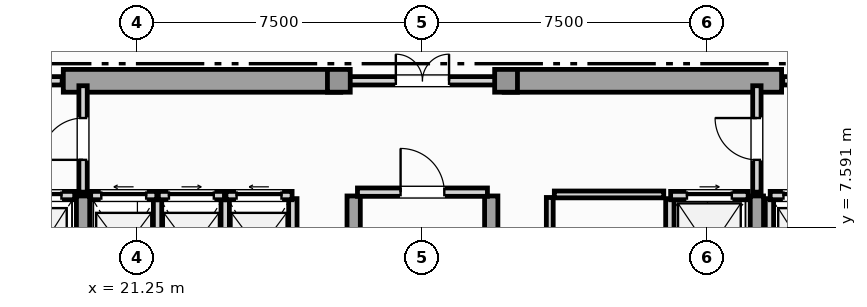
"""IFC4 building model, lengths in metres.
Left out: names, types, materials, properties, quantities, classifications, styles, units other than length and angle.
Written with IfcOpenShell. Run it as: python <this file> out.ifc"""

import sys

from ifc_helpers import new_model, si_unit, direction, frame, frame_2d, origin, origin_2d, place, context, subcontext, project, spatial, rectangle, extrude, element, fill, save


model = new_model("IFC4")
c1 = context("Model", 3, precision=1e-05, world=origin(), true_north=direction((0.0, 1.0)))
c2 = subcontext(c1, "Body", "Model", "MODEL_VIEW")
j1 = project(units=[si_unit("LENGTHUNIT", "METRE"), si_unit("PLANEANGLEUNIT", "RADIAN")], contexts=[c1])
p1 = place(None, origin())
s1 = spatial("IfcSite", under=j1, at=p1, CompositionType="ELEMENT")
p2 = place(p1, origin())
s2 = spatial("IfcBuilding", under=s1, at=p2, CompositionType="ELEMENT")
p3 = place(p2, frame((0.0, 0.0, 281.05)))
s3 = spatial("IfcBuildingStorey", under=s2, at=p3, CompositionType="ELEMENT", Elevation=281.05)
for number, where, z_axis, x_axis in (
    (1, (19.3, 11.45, 0.0), (0.0, 0.0, 1.0), (1.0, 0.0, 0.0)),
    (2, (30.9, 11.45, 0.0), (0.0, 0.0, 1.0), (1.0, 0.0, 0.0)),
):
    element("IfcWall", number, at=place(p3, frame(where, z_axis=z_axis, x_axis=x_axis)), inside=s3, PredefinedType="SHEAR", context=c2, shape_type="SweptSolid", body=[
        extrude(rectangle(XDim=7.3, YDim=0.6, at=frame_2d((3.65, 0.0))), origin(), (0.0, 0.0, 1.0), 3.65),
    ])
for number, where, z_axis, x_axis in (
    (3, (19.82, 0.92, 0.0), (0.0, 0.0, 1.0), (0.0, 1.0, 0.0)),
    (4, (26.94, 0.92, 0.0), (0.0, 0.0, 1.0), (0.0, 1.0, 0.0)),
    (5, (30.56, 0.92, 0.0), (0.0, 0.0, 1.0), (0.0, 1.0, 0.0)),
    (6, (37.55, 0.92, 0.0), (0.0, 0.0, 1.0), (0.0, 1.0, 0.0)),
):
    element("IfcWall", number, at=place(p3, frame(where, z_axis=z_axis, x_axis=x_axis)), inside=s3, PredefinedType="SHEAR", context=c2, shape_type="SweptSolid", body=[
        extrude(rectangle(XDim=7.5, YDim=0.35, at=frame_2d((3.75, 0.0))), origin(), (0.0, 0.0, 1.0), 3.65),
    ])
for number, where, z_axis, x_axis in (
    (7, (26.55, 11.45, 0.0), (0.0, 0.0, 1.0), (1.0, 0.0, 0.0)),
    (8, (30.95, 11.45, 0.0), (0.0, 0.0, 1.0), (1.0, 0.0, 0.0)),
):
    element("IfcColumn", number, at=place(p3, frame(where, z_axis=z_axis, x_axis=x_axis)), inside=s3, PredefinedType="COLUMN", context=c2, shape_type="SweptSolid", body=[
        extrude(rectangle(XDim=0.6, YDim=0.6, at=origin_2d()), origin(), (0.0, 0.0, 1.0), 3.85),
    ])
p4 = place(p3, frame((17.78, 8.43, 0.0), z_axis=(0.0, 0.0, 1.0), x_axis=(1.0, 0.0, 0.0)))
e9 = element("IfcWall", 9, at=p4, inside=s3, PredefinedType="SOLIDWALL", context=c2, shape_type="SweptSolid", body=[
    extrude(rectangle(XDim=1.82, YDim=0.22, at=frame_2d((0.91, 0.0))), origin(), (0.0, 0.0, 1.0), 3.65),
])
p5 = place(p4, frame((0.35, 0.0, 0.0)))
e10 = element("IfcOpeningElement", 10, at=p5, cuts=e9, PredefinedType="OPENING", context=c2, shape_type="SweptSolid", body=[
    extrude(rectangle(XDim=1.12, YDim=2.25, at=frame_2d((0.56, 1.125))), frame((0.0, 0.12, 0.0), z_axis=(0.0, -1.0, 0.0), x_axis=(1.0, 0.0, 0.0)), (0.0, 0.0, 1.0), 0.24),
])
p6 = place(p3, frame((37.88, 5.65, 0.0), z_axis=(0.0, 0.0, 1.0), x_axis=(0.0, 1.0, 0.0)))
e11 = element("IfcWall", 11, at=p6, inside=s3, PredefinedType="SOLIDWALL", context=c2, shape_type="SweptSolid", body=[
    extrude(rectangle(XDim=2.7, YDim=0.22, at=frame_2d((1.35, 0.0))), origin(), (0.0, 0.0, 1.0), 3.65),
])
p7 = place(p3, frame((37.9, 8.43, 0.0), z_axis=(0.0, 0.0, 1.0), x_axis=(1.0, 0.0, 0.0)))
e12 = element("IfcWall", 12, at=p7, inside=s3, PredefinedType="SOLIDWALL", context=c2, shape_type="SweptSolid", body=[
    extrude(rectangle(XDim=1.82, YDim=0.22, at=frame_2d((0.91, 0.0))), origin(), (0.0, 0.0, 1.0), 3.65),
])
p8 = place(p7, frame((0.35, 0.0, 0.0)))
e13 = element("IfcOpeningElement", 13, at=p8, cuts=e12, PredefinedType="OPENING", context=c2, shape_type="SweptSolid", body=[
    extrude(rectangle(XDim=1.12, YDim=2.25, at=frame_2d((0.56, 1.125))), frame((0.0, 0.12, 0.0), z_axis=(0.0, -1.0, 0.0), x_axis=(1.0, 0.0, 0.0)), (0.0, 0.0, 1.0), 0.24),
])
p9 = place(p3, frame((35.26, 5.65, 0.0), z_axis=(0.0, 0.0, 1.0), x_axis=(0.0, 1.0, 0.0)))
e14 = element("IfcWall", 14, at=p9, inside=s3, PredefinedType="SOLIDWALL", context=c2, shape_type="SweptSolid", body=[
    extrude(rectangle(XDim=2.7, YDim=0.22, at=frame_2d((1.35, 0.0))), origin(), (0.0, 0.0, 1.0), 3.65),
])
p10 = place(p3, frame((35.28, 8.43, 0.0), z_axis=(0.0, 0.0, 1.0), x_axis=(1.0, 0.0, 0.0)))
e15 = element("IfcWall", 15, at=p10, inside=s3, PredefinedType="SOLIDWALL", context=c2, shape_type="SweptSolid", body=[
    extrude(rectangle(XDim=2.04, YDim=0.22, at=frame_2d((1.02, 0.0))), origin(), (0.0, 0.0, 1.0), 3.65),
])
p11 = place(p10, frame((0.43, 0.0, 0.0)))
e16 = element("IfcOpeningElement", 16, at=p11, cuts=e15, PredefinedType="OPENING", context=c2, shape_type="SweptSolid", body=[
    extrude(rectangle(XDim=1.18, YDim=2.2, at=frame_2d((0.59, 1.1))), frame((0.0, 0.12, 0.0), z_axis=(0.0, -1.0, 0.0), x_axis=(1.0, 0.0, 0.0)), (0.0, 0.0, 1.0), 0.24),
])
p12 = place(p3, frame((21.78, 5.65, 0.0), z_axis=(0.0, 0.0, 1.0), x_axis=(0.0, 1.0, 0.0)))
e17 = element("IfcWall", 17, at=p12, inside=s3, PredefinedType="SOLIDWALL", context=c2, shape_type="SweptSolid", body=[
    extrude(rectangle(XDim=2.7, YDim=0.22, at=frame_2d((1.35, 0.0))), origin(), (0.0, 0.0, 1.0), 3.65),
])
p13 = place(p3, frame((20.02, 8.43, 0.0), z_axis=(0.0, 0.0, 1.0), x_axis=(1.0, 0.0, 0.0)))
e18 = element("IfcWall", 18, at=p13, inside=s3, PredefinedType="SOLIDWALL", context=c2, shape_type="SweptSolid", body=[
    extrude(rectangle(XDim=1.74, YDim=0.22, at=frame_2d((0.87, 0.0))), origin(), (0.0, 0.0, 1.0), 3.65),
])
p14 = place(p13, frame((0.28, 0.0, 0.0)))
e19 = element("IfcOpeningElement", 19, at=p14, cuts=e18, PredefinedType="OPENING", context=c2, shape_type="SweptSolid", body=[
    extrude(rectangle(XDim=1.18, YDim=2.2, at=frame_2d((0.59, 1.1))), frame((0.0, 0.12, 0.0), z_axis=(0.0, -1.0, 0.0), x_axis=(1.0, 0.0, 0.0)), (0.0, 0.0, 1.0), 0.24),
])
p15 = place(p3, frame((23.56, 5.65, 0.0), z_axis=(0.0, 0.0, 1.0), x_axis=(0.0, 1.0, 0.0)))
e20 = element("IfcWall", 20, at=p15, inside=s3, PredefinedType="SOLIDWALL", context=c2, shape_type="SweptSolid", body=[
    extrude(rectangle(XDim=2.7, YDim=0.22, at=frame_2d((1.35, 0.0))), origin(), (0.0, 0.0, 1.0), 3.65),
])
p16 = place(p3, frame((21.8, 8.43, 0.0), z_axis=(0.0, 0.0, 1.0), x_axis=(1.0, 0.0, 0.0)))
e21 = element("IfcWall", 21, at=p16, inside=s3, PredefinedType="SOLIDWALL", context=c2, shape_type="SweptSolid", body=[
    extrude(rectangle(XDim=1.74, YDim=0.22, at=frame_2d((0.87, 0.0))), origin(), (0.0, 0.0, 1.0), 3.65),
])
p17 = place(p16, frame((0.28, 0.0, 0.0)))
e22 = element("IfcOpeningElement", 22, at=p17, cuts=e21, PredefinedType="OPENING", context=c2, shape_type="SweptSolid", body=[
    extrude(rectangle(XDim=1.18, YDim=2.2, at=frame_2d((0.59, 1.1))), frame((0.0, 0.12, 0.0), z_axis=(0.0, -1.0, 0.0), x_axis=(1.0, 0.0, 0.0)), (0.0, 0.0, 1.0), 0.24),
])
p18 = place(p3, frame((25.34, 5.65, 0.0), z_axis=(0.0, 0.0, 1.0), x_axis=(0.0, 1.0, 0.0)))
e23 = element("IfcWall", 23, at=p18, inside=s3, PredefinedType="SOLIDWALL", context=c2, shape_type="SweptSolid", body=[
    extrude(rectangle(XDim=2.7, YDim=0.22, at=frame_2d((1.35, 0.0))), origin(), (0.0, 0.0, 1.0), 3.65),
])
p19 = place(p3, frame((23.58, 8.43, 0.0), z_axis=(0.0, 0.0, 1.0), x_axis=(1.0, 0.0, 0.0)))
e24 = element("IfcWall", 24, at=p19, inside=s3, PredefinedType="SOLIDWALL", context=c2, shape_type="SweptSolid", body=[
    extrude(rectangle(XDim=1.74, YDim=0.22, at=frame_2d((0.87, 0.0))), origin(), (0.0, 0.0, 1.0), 3.65),
])
p20 = place(p19, frame((0.28, 0.0, 0.0)))
e25 = element("IfcOpeningElement", 25, at=p20, cuts=e24, PredefinedType="OPENING", context=c2, shape_type="SweptSolid", body=[
    extrude(rectangle(XDim=1.18, YDim=2.2, at=frame_2d((0.59, 1.1))), frame((0.0, 0.12, 0.0), z_axis=(0.0, -1.0, 0.0), x_axis=(1.0, 0.0, 0.0)), (0.0, 0.0, 1.0), 0.24),
])
p21 = place(p3, frame((27.04, 8.52, 0.0), z_axis=(0.0, 0.0, 1.0), x_axis=(1.0, 0.0, 0.0)))
e26 = element("IfcWall", 26, at=p21, inside=s3, PredefinedType="SOLIDWALL", context=c2, shape_type="SweptSolid", body=[
    extrude(rectangle(XDim=3.42, YDim=0.22, at=frame_2d((1.71, 0.0))), origin(), (0.0, 0.0, 1.0), 3.65),
])
p22 = place(p21, frame((1.135, 0.0, 0.0)))
e27 = element("IfcOpeningElement", 27, at=p22, cuts=e26, PredefinedType="OPENING", context=c2, shape_type="SweptSolid", body=[
    extrude(rectangle(XDim=1.15, YDim=2.2, at=frame_2d((0.575, 1.1))), frame((0.0, 0.12, 0.0), z_axis=(0.0, -1.0, 0.0), x_axis=(1.0, 0.0, 0.0)), (0.0, 0.0, 1.0), 0.24),
])
p23 = place(p3, frame((19.82, 8.52, 0.0), z_axis=(0.0, 0.0, 1.0), x_axis=(0.0, 1.0, 0.0)))
e28 = element("IfcWall", 28, at=p23, inside=s3, PredefinedType="SOLIDWALL", context=c2, shape_type="SweptSolid", body=[
    extrude(rectangle(XDim=2.8, YDim=0.22, at=frame_2d((1.4, 0.0))), origin(), (0.0, 0.0, 1.0), 3.105),
])
p24 = place(p23, frame((0.85, 0.0, 0.0)))
e29 = element("IfcOpeningElement", 29, at=p24, cuts=e28, PredefinedType="OPENING", context=c2, shape_type="SweptSolid", body=[
    extrude(rectangle(XDim=1.1, YDim=2.2, at=frame_2d((0.55, 1.1))), frame((0.0, 0.12, 0.0), z_axis=(0.0, -1.0, 0.0), x_axis=(1.0, 0.0, 0.0)), (0.0, 0.0, 1.0), 0.24),
])
p25 = place(p3, frame((37.55, 8.52, 0.0), z_axis=(0.0, 0.0, 1.0), x_axis=(0.0, 1.0, 0.0)))
e30 = element("IfcWall", 30, at=p25, inside=s3, PredefinedType="SOLIDWALL", context=c2, shape_type="SweptSolid", body=[
    extrude(rectangle(XDim=2.8, YDim=0.22, at=frame_2d((1.4, 0.0))), origin(), (0.0, 0.0, 1.0), 3.105),
])
p26 = place(p25, frame((0.85, 0.0, 0.0)))
e31 = element("IfcOpeningElement", 31, at=p26, cuts=e30, PredefinedType="OPENING", context=c2, shape_type="SweptSolid", body=[
    extrude(rectangle(XDim=1.1, YDim=2.2, at=frame_2d((0.55, 1.1))), frame((0.0, 0.12, 0.0), z_axis=(0.0, -1.0, 0.0), x_axis=(1.0, 0.0, 0.0)), (0.0, 0.0, 1.0), 0.24),
])
p27 = place(p3, frame((16.23, 11.45, 0.0), z_axis=(0.0, 0.0, 1.0), x_axis=(1.0, 0.0, 0.0)))
e32 = element("IfcWall", 32, at=p27, inside=s3, PredefinedType="SOLIDWALL", context=c2, shape_type="SweptSolid", body=[
    extrude(rectangle(XDim=3.04, YDim=0.22, at=frame_2d((1.52, 0.0))), origin(), (0.0, 0.0, 1.0), 3.65),
])
p28 = place(p27, frame((0.97, 0.0, 0.0)))
e33 = element("IfcOpeningElement", 33, at=p28, cuts=e32, PredefinedType="OPENING", context=c2, shape_type="SweptSolid", body=[
    extrude(rectangle(XDim=1.1, YDim=2.2, at=frame_2d((0.55, 1.1))), frame((0.0, 0.12, 0.0), z_axis=(0.0, -1.0, 0.0), x_axis=(1.0, 0.0, 0.0)), (0.0, 0.0, 1.0), 0.24),
])
p29 = place(p3, frame((26.63, 11.45, 0.0), z_axis=(0.0, 0.0, 1.0), x_axis=(1.0, 0.0, 0.0)))
e34 = element("IfcWall", 34, at=p29, inside=s3, PredefinedType="SOLIDWALL", context=c2, shape_type="SweptSolid", body=[
    extrude(rectangle(XDim=4.24, YDim=0.22, at=frame_2d((2.12, 0.0))), origin(), (0.0, 0.0, 1.0), 3.65),
])
p30 = place(p29, frame((1.42, 0.0, 0.0)))
e35 = element("IfcOpeningElement", 35, at=p30, cuts=e34, PredefinedType="OPENING", context=c2, shape_type="SweptSolid", body=[
    extrude(rectangle(XDim=1.4, YDim=2.2, at=frame_2d((0.7, 1.1))), frame((0.0, 0.12, 0.0), z_axis=(0.0, -1.0, 0.0), x_axis=(1.0, 0.0, 0.0)), (0.0, 0.0, 1.0), 0.24),
])
p31 = place(p3, frame((38.23, 11.45, 0.0), z_axis=(0.0, 0.0, 1.0), x_axis=(1.0, 0.0, 0.0)))
e36 = element("IfcWall", 36, at=p31, inside=s3, PredefinedType="SOLIDWALL", context=c2, shape_type="SweptSolid", body=[
    extrude(rectangle(XDim=3.04, YDim=0.22, at=frame_2d((1.52, 0.0))), origin(), (0.0, 0.0, 1.0), 3.65),
])
p32 = place(p31, frame((0.97, 0.0, 0.0)))
e37 = element("IfcOpeningElement", 37, at=p32, cuts=e36, PredefinedType="OPENING", context=c2, shape_type="SweptSolid", body=[
    extrude(rectangle(XDim=1.1, YDim=2.2, at=frame_2d((0.55, 1.1))), frame((0.0, 0.12, 0.0), z_axis=(0.0, -1.0, 0.0), x_axis=(1.0, 0.0, 0.0)), (0.0, 0.0, 1.0), 0.24),
])
p33 = place(p3, frame((32.1, 5.65, 0.0), z_axis=(0.0, 0.0, 1.0), x_axis=(0.0, 1.0, 0.0)))
e38 = element("IfcWall", 38, at=p33, inside=s3, PredefinedType="PARTITIONING", context=c2, shape_type="SweptSolid", body=[
    extrude(rectangle(XDim=2.73, YDim=0.18, at=frame_2d((1.365, 0.0))), origin(), (0.0, 0.0, 1.0), 3.65),
])
p34 = place(p33, frame((0.925, 0.0, 0.0)))
e39 = element("IfcOpeningElement", 39, at=p34, cuts=e38, PredefinedType="OPENING", context=c2, shape_type="SweptSolid", body=[
    extrude(rectangle(XDim=0.88, YDim=2.05, at=frame_2d((0.44, 1.025))), frame((0.0, 0.1, 0.0), z_axis=(0.0, -1.0, 0.0), x_axis=(1.0, 0.0, 0.0)), (0.0, 0.0, 1.0), 0.2),
])
p35 = place(p3, frame((32.22, 8.46, 0.0), z_axis=(0.0, 0.0, 1.0), x_axis=(1.0, 0.0, 0.0)))
e40 = element("IfcWall", 40, at=p35, inside=s3, PredefinedType="PARTITIONING", context=c2, shape_type="SweptSolid", body=[
    extrude(rectangle(XDim=2.88, YDim=0.18, at=frame_2d((1.44, 0.0))), origin(), (0.0, 0.0, 1.0), 3.65),
])
p36 = place(p5, origin())
e41 = element("IfcDoor", 41, at=p36, inside=s3, OperationType="SLIDING_TO_RIGHT", PredefinedType="DOOR", context=c2, shape_type="SweptSolid", body=[
    extrude(rectangle(XDim=1.12, YDim=2.25, at=frame_2d((0.56, 1.125))), frame((0.0, 0.025, 0.0), z_axis=(0.0, -1.0, 0.0), x_axis=(1.0, 0.0, 0.0)), (0.0, 0.0, 1.0), 0.05),
])
fill(e10, e41)
p37 = place(p8, origin())
e42 = element("IfcDoor", 42, at=p37, inside=s3, OperationType="SLIDING_TO_LEFT", PredefinedType="DOOR", context=c2, shape_type="SweptSolid", body=[
    extrude(rectangle(XDim=1.12, YDim=2.25, at=frame_2d((0.56, 1.125))), frame((0.0, 0.025, 0.0), z_axis=(0.0, -1.0, 0.0), x_axis=(1.0, 0.0, 0.0)), (0.0, 0.0, 1.0), 0.05),
])
fill(e13, e42)
p38 = place(p11, origin())
e43 = element("IfcDoor", 43, at=p38, inside=s3, OperationType="SLIDING_TO_RIGHT", PredefinedType="DOOR", context=c2, shape_type="SweptSolid", body=[
    extrude(rectangle(XDim=1.18, YDim=2.2, at=frame_2d((0.59, 1.1))), frame((0.0, 0.025, 0.0), z_axis=(0.0, -1.0, 0.0), x_axis=(1.0, 0.0, 0.0)), (0.0, 0.0, 1.0), 0.05),
])
fill(e16, e43)
p39 = place(p14, origin())
e44 = element("IfcDoor", 44, at=p39, inside=s3, OperationType="SLIDING_TO_LEFT", PredefinedType="DOOR", context=c2, shape_type="SweptSolid", body=[
    extrude(rectangle(XDim=1.18, YDim=2.2, at=frame_2d((0.59, 1.1))), frame((0.0, 0.025, 0.0), z_axis=(0.0, -1.0, 0.0), x_axis=(1.0, 0.0, 0.0)), (0.0, 0.0, 1.0), 0.05),
])
fill(e19, e44)
p40 = place(p17, origin())
e45 = element("IfcDoor", 45, at=p40, inside=s3, OperationType="SLIDING_TO_RIGHT", PredefinedType="DOOR", context=c2, shape_type="SweptSolid", body=[
    extrude(rectangle(XDim=1.18, YDim=2.2, at=frame_2d((0.59, 1.1))), frame((0.0, 0.025, 0.0), z_axis=(0.0, -1.0, 0.0), x_axis=(1.0, 0.0, 0.0)), (0.0, 0.0, 1.0), 0.05),
])
fill(e22, e45)
p41 = place(p20, origin())
e46 = element("IfcDoor", 46, at=p41, inside=s3, OperationType="SLIDING_TO_LEFT", PredefinedType="DOOR", context=c2, shape_type="SweptSolid", body=[
    extrude(rectangle(XDim=1.18, YDim=2.2, at=frame_2d((0.59, 1.1))), frame((0.0, 0.025, 0.0), z_axis=(0.0, -1.0, 0.0), x_axis=(1.0, 0.0, 0.0)), (0.0, 0.0, 1.0), 0.05),
])
fill(e25, e46)
p42 = place(p22, origin())
e47 = element("IfcDoor", 47, at=p42, inside=s3, OperationType="SINGLE_SWING_LEFT", PredefinedType="DOOR", context=c2, shape_type="SweptSolid", body=[
    extrude(rectangle(XDim=1.15, YDim=2.2, at=frame_2d((0.575, 1.1))), frame((0.0, 0.025, 0.0), z_axis=(0.0, -1.0, 0.0), x_axis=(1.0, 0.0, 0.0)), (0.0, 0.0, 1.0), 0.05),
])
fill(e27, e47)
p43 = place(p24, origin())
e48 = element("IfcDoor", 48, at=p43, inside=s3, OperationType="SINGLE_SWING_LEFT", PredefinedType="DOOR", context=c2, shape_type="SweptSolid", body=[
    extrude(rectangle(XDim=1.1, YDim=2.2, at=frame_2d((0.55, 1.1))), frame((0.0, 0.025, 0.0), z_axis=(0.0, -1.0, 0.0), x_axis=(1.0, 0.0, 0.0)), (0.0, 0.0, 1.0), 0.05),
])
fill(e29, e48)
p44 = place(p26, origin())
e49 = element("IfcDoor", 49, at=p44, inside=s3, OperationType="SINGLE_SWING_RIGHT", PredefinedType="DOOR", context=c2, shape_type="SweptSolid", body=[
    extrude(rectangle(XDim=1.1, YDim=2.2, at=frame_2d((0.55, 1.1))), frame((0.0, 0.025, 0.0), z_axis=(0.0, -1.0, 0.0), x_axis=(1.0, 0.0, 0.0)), (0.0, 0.0, 1.0), 0.05),
])
fill(e31, e49)
p45 = place(p30, origin())
e50 = element("IfcDoor", 50, at=p45, inside=s3, OperationType="DOUBLE_DOOR_SINGLE_SWING", PredefinedType="DOOR", context=c2, shape_type="SweptSolid", body=[
    extrude(rectangle(XDim=1.4, YDim=2.2, at=frame_2d((0.7, 1.1))), frame((0.0, 0.025, 0.0), z_axis=(0.0, -1.0, 0.0), x_axis=(1.0, 0.0, 0.0)), (0.0, 0.0, 1.0), 0.05),
])
fill(e35, e50)
save(model, sys.argv[1])
